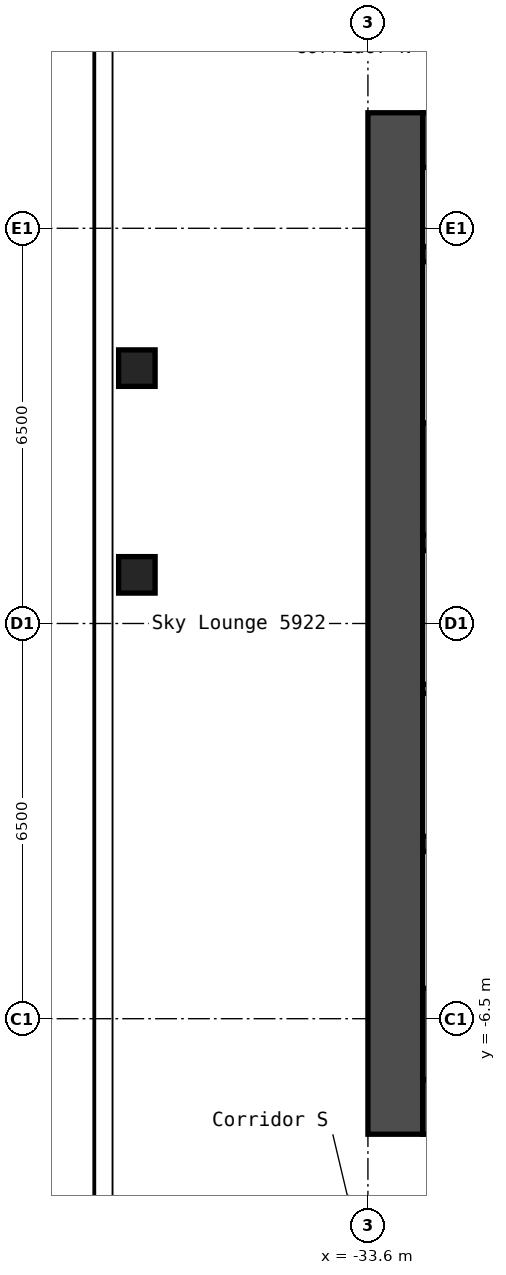
"""IFC4 building model, lengths in metres.
Left out: names, types, materials, properties, quantities, classifications, styles, units other than length and angle.
Written with IfcOpenShell. Run it as: python <this file> out.ifc"""

import sys

from ifc_helpers import new_model, si_unit, direction, frame, frame_2d, origin, origin_2d, place, context, subcontext, project, spatial, rectangle, hollow_rectangle, extrude, element, save


model = new_model("IFC4")
c1 = context("Model", 3, precision=1e-05, world=origin(), true_north=direction((0.0, 1.0)))
c2 = subcontext(c1, "Body", "Model", "MODEL_VIEW")
j1 = project(units=[si_unit("LENGTHUNIT", "METRE"), si_unit("PLANEANGLEUNIT", "RADIAN")], contexts=[c1])
p1 = place(None, origin())
s1 = spatial("IfcSite", under=j1, at=p1, CompositionType="ELEMENT")
p2 = place(p1, origin())
s2 = spatial("IfcBuilding", under=s1, at=p2, CompositionType="ELEMENT")
p3 = place(p2, frame((0.0, 0.0, 209.0)))
s3 = spatial("IfcBuildingStorey", under=s2, at=p3, CompositionType="ELEMENT", Elevation=209.0)
for number, where, z_axis, x_axis in (
    (1, (-37.4, 0.8, 0.0), (0.0, 0.0, 1.0), (1.0, 0.0, 0.0)),
    (2, (-37.4, 4.2, 0.0), (0.0, 0.0, 1.0), (1.0, 0.0, 0.0)),
):
    element("IfcColumn", number, at=place(p3, frame(where, z_axis=z_axis, x_axis=x_axis)), inside=s3, PredefinedType="COLUMN", context=c2, shape_type="SweptSolid", body=[
        extrude(hollow_rectangle(XDim=0.6, YDim=0.6, WallThickness=0.025, InnerFilletRadius=0.038, OuterFilletRadius=0.062, at=origin_2d()), origin(), (0.0, 0.0, 1.0), 2.75),
    ])
p4 = place(p3, frame((-33.15, -8.4, 0.0), z_axis=(0.0, 0.0, 1.0), x_axis=(0.0, 1.0, 0.0)))
e3 = element("IfcWall", 3, at=p4, inside=s3, PredefinedType="SHEAR", context=c2, shape_type="SweptSolid", body=[
    extrude(rectangle(XDim=16.8, YDim=0.9, at=frame_2d((8.4, 0.0))), origin(), (0.0, 0.0, 1.0), 2.75),
])
p5 = place(p3, frame((-32.7, 7.95, 0.0), z_axis=(0.0, 0.0, 1.0), x_axis=(1.0, 0.0, 0.0)))
e4 = element("IfcWall", 4, at=p5, inside=s3, PredefinedType="SHEAR", context=c2, shape_type="SweptSolid", body=[
    extrude(rectangle(XDim=15.0, YDim=0.9, at=frame_2d((7.5, 0.0))), origin(), (0.0, 0.0, 1.0), 2.75),
])
p6 = place(p5, frame((3.4, 0.0, 0.0)))
e5 = element("IfcOpeningElement", 5, at=p6, cuts=e4, PredefinedType="OPENING", context=c2, shape_type="SweptSolid", body=[
    extrude(rectangle(XDim=1.2, YDim=2.1, at=frame_2d((0.6, 1.05))), frame((0.0, 0.46, 0.0), z_axis=(0.0, -1.0, 0.0), x_axis=(1.0, 0.0, 0.0)), (0.0, 0.0, 1.0), 0.92),
])
p7 = place(p5, frame((0.75, 0.0, 0.0)))
e6 = element("IfcOpeningElement", 6, at=p7, cuts=e4, PredefinedType="OPENING", context=c2, shape_type="SweptSolid", body=[
    extrude(rectangle(XDim=0.9, YDim=2.1, at=frame_2d((0.45, 1.05))), frame((0.0, 0.46, 0.0), z_axis=(0.0, -1.0, 0.0), x_axis=(1.0, 0.0, 0.0)), (0.0, 0.0, 1.0), 0.92),
])
p8 = place(p3, frame((-32.7, -7.95, 0.0), z_axis=(0.0, 0.0, 1.0), x_axis=(1.0, 0.0, 0.0)))
e7 = element("IfcWall", 7, at=p8, inside=s3, PredefinedType="SHEAR", context=c2, shape_type="SweptSolid", body=[
    extrude(rectangle(XDim=15.0, YDim=0.9, at=frame_2d((7.5, 0.0))), origin(), (0.0, 0.0, 1.0), 2.75),
])
p9 = place(p8, frame((11.45, 0.0, 0.0)))
e8 = element("IfcOpeningElement", 8, at=p9, cuts=e7, PredefinedType="OPENING", context=c2, shape_type="SweptSolid", body=[
    extrude(rectangle(XDim=1.0, YDim=2.1, at=frame_2d((0.5, 1.05))), frame((0.0, 0.46, 0.0), z_axis=(0.0, -1.0, 0.0), x_axis=(1.0, 0.0, 0.0)), (0.0, 0.0, 1.0), 0.92),
])
p10 = place(p3, frame((-32.7, 1.325, 0.0), z_axis=(0.0, 0.0, 1.0), x_axis=(1.0, 0.0, 0.0)))
e9 = element("IfcWall", 9, at=p10, inside=s3, PredefinedType="SHEAR", context=c2, shape_type="SweptSolid", body=[
    extrude(rectangle(XDim=5.05, YDim=0.25, at=frame_2d((2.525, 0.0))), origin(), (0.0, 0.0, 1.0), 2.75),
])
p11 = place(p10, frame((3.3, 0.0, 0.0)))
e10 = element("IfcOpeningElement", 10, at=p11, cuts=e9, PredefinedType="OPENING", context=c2, shape_type="SweptSolid", body=[
    extrude(rectangle(XDim=1.2, YDim=2.1, at=frame_2d((0.6, 1.05))), frame((0.0, 0.135, 0.0), z_axis=(0.0, -1.0, 0.0), x_axis=(1.0, 0.0, 0.0)), (0.0, 0.0, 1.0), 0.27),
])
p12 = place(p3, frame((-32.7, 2.375, 0.0), z_axis=(0.0, 0.0, 1.0), x_axis=(1.0, 0.0, 0.0)))
e11 = element("IfcWall", 11, at=p12, inside=s3, PredefinedType="SHEAR", context=c2, shape_type="SweptSolid", body=[
    extrude(rectangle(XDim=2.4, YDim=1.85, at=frame_2d((1.2, 0.0))), origin(), (0.0, 0.0, 1.0), 2.75),
])
p13 = place(p3, frame((-32.7, 6.075, 0.0), z_axis=(0.0, 0.0, 1.0), x_axis=(1.0, 0.0, 0.0)))
e12 = element("IfcWall", 12, at=p13, inside=s3, PredefinedType="SHEAR", context=c2, shape_type="SweptSolid", body=[
    extrude(rectangle(XDim=2.4, YDim=0.25, at=frame_2d((1.2, 0.0))), origin(), (0.0, 0.0, 1.0), 2.75),
])
p14 = place(p3, frame((-32.7, -3.625, 0.0), z_axis=(0.0, 0.0, 1.0), x_axis=(1.0, 0.0, 0.0)))
e13 = element("IfcWall", 13, at=p14, inside=s3, PredefinedType="SHEAR", context=c2, shape_type="SweptSolid", body=[
    extrude(rectangle(XDim=4.55, YDim=0.25, at=frame_2d((2.275, 0.0))), origin(), (0.0, 0.0, 1.0), 2.75),
])
p15 = place(p14, frame((2.85, 0.0, 0.0)))
e14 = element("IfcOpeningElement", 14, at=p15, cuts=e13, PredefinedType="OPENING", context=c2, shape_type="SweptSolid", body=[
    extrude(rectangle(XDim=1.1, YDim=2.1, at=frame_2d((0.55, 1.05))), frame((0.0, 0.135, 0.0), z_axis=(0.0, -1.0, 0.0), x_axis=(1.0, 0.0, 0.0)), (0.0, 0.0, 1.0), 0.27),
])
p16 = place(p14, frame((0.6, 0.0, 0.0)))
e15 = element("IfcOpeningElement", 15, at=p16, cuts=e13, PredefinedType="OPENING", context=c2, shape_type="SweptSolid", body=[
    extrude(rectangle(XDim=1.1, YDim=2.1, at=frame_2d((0.55, 1.05))), frame((0.0, 0.135, 0.0), z_axis=(0.0, -1.0, 0.0), x_axis=(1.0, 0.0, 0.0)), (0.0, 0.0, 1.0), 0.27),
])
p17 = place(p3, frame((-32.7, -6.75, 0.0), z_axis=(0.0, 0.0, 1.0), x_axis=(1.0, 0.0, 0.0)))
e16 = element("IfcWall", 16, at=p17, inside=s3, PredefinedType="SHEAR", context=c2, shape_type="SweptSolid", body=[
    extrude(rectangle(XDim=4.55, YDim=1.5, at=frame_2d((2.275, 0.0))), origin(), (0.0, 0.0, 1.0), 2.75),
])
p18 = place(p3, frame((-32.7, -1.075, 0.0), z_axis=(0.0, 0.0, 1.0), x_axis=(1.0, 0.0, 0.0)))
e17 = element("IfcWall", 17, at=p18, inside=s3, PredefinedType="PARTITIONING", context=c2, shape_type="SweptSolid", body=[
    extrude(rectangle(XDim=1.6, YDim=0.15, at=frame_2d((0.8, 0.0))), origin(), (0.0, 0.0, 1.0), 2.75),
])
save(model, sys.argv[1])
